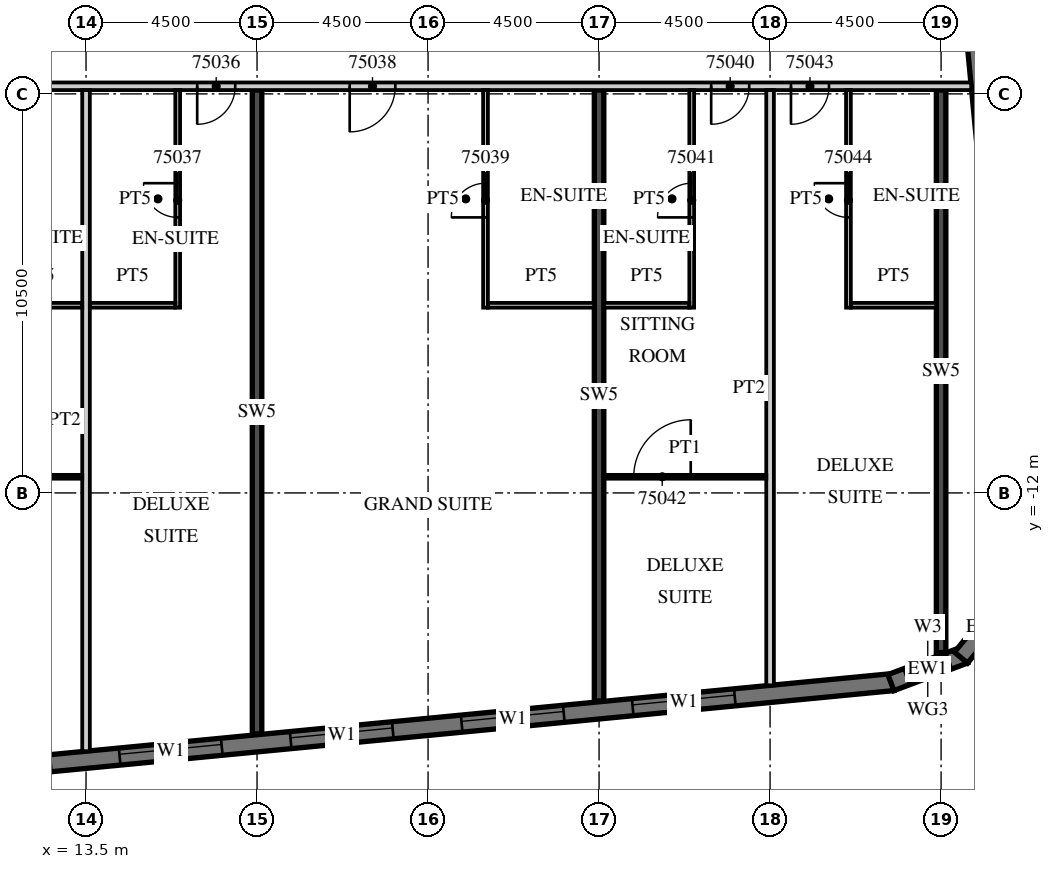
"""IFC4 building model, lengths in metres.
Left out: names, types, materials, properties, quantities, classifications, styles, units other than length and angle.
Written with IfcOpenShell. Run it as: python <this file> out.ifc"""

import sys

from ifc_helpers import new_model, si_unit, direction, frame, frame_2d, origin, place, context, subcontext, project, spatial, polyline, rectangle, outline, extrude, element, fill, save


model = new_model("IFC4")
c1 = context("Model", 3, precision=1e-05, world=origin(), true_north=direction((0.0, 1.0)))
c2 = subcontext(c1, "Body", "Model", "MODEL_VIEW")
j1 = project(units=[si_unit("LENGTHUNIT", "METRE"), si_unit("PLANEANGLEUNIT", "RADIAN")], contexts=[c1])
p1 = place(None, origin())
s1 = spatial("IfcSite", under=j1, at=p1, CompositionType="ELEMENT")
p2 = place(p1, origin())
s2 = spatial("IfcBuilding", under=s1, at=p2, CompositionType="ELEMENT")
p3 = place(p2, frame((0.0, 0.0, 298.2)))
s3 = spatial("IfcBuildingStorey", under=s2, at=p3, CompositionType="ELEMENT", Elevation=298.2)
p4 = place(p3, frame((18.0, -18.341, 0.0), z_axis=(0.0, 0.0, 1.0), x_axis=(0.0, 1.0, 0.0)))
e1 = element("IfcWall", 1, at=p4, inside=s3, PredefinedType="SHEAR", context=c2, shape_type="SweptSolid", body=[
    extrude(rectangle(XDim=16.941, YDim=0.25, at=frame_2d((8.47, 0.0))), origin(), (0.0, 0.0, 1.0), 3.3),
])
p5 = place(p3, frame((27.0, -17.474, 0.0), z_axis=(0.0, 0.0, 1.0), x_axis=(0.0, 1.0, 0.0)))
e2 = element("IfcWall", 2, at=p5, inside=s3, PredefinedType="SHEAR", context=c2, shape_type="SweptSolid", body=[
    extrude(rectangle(XDim=16.074, YDim=0.25, at=frame_2d((8.037, 0.0))), origin(), (0.0, 0.0, 1.0), 3.3),
])
p6 = place(p3, frame((36.0, -16.199, 0.0), z_axis=(0.0, 0.0, 1.0), x_axis=(0.0, 1.0, 0.0)))
e3 = element("IfcWall", 3, at=p6, inside=s3, PredefinedType="SHEAR", context=c2, shape_type="SweptSolid", body=[
    extrude(rectangle(XDim=14.799, YDim=0.25, at=frame_2d((7.399, 0.0))), origin(), (0.0, 0.0, 1.0), 3.3),
])
p7 = place(p3, frame((-13.521, -21.624, 0.0), z_axis=(0.0, 0.0, 1.0), x_axis=(0.995396186218, 0.095845878695, 0.0)))
e4 = element("IfcWall", 4, at=p7, inside=s3, PredefinedType="SOLIDWALL", context=c2, shape_type="SweptSolid", body=[
    extrude(rectangle(XDim=48.481, YDim=0.45, at=frame_2d((24.241, 0.0))), origin(), (0.0, 0.0, 1.0), 3.02),
])
p8 = place(p7, frame((0.91, 0.0, 0.45)))
e5 = element("IfcOpeningElement", 5, at=p8, cuts=e4, PredefinedType="OPENING", context=c2, shape_type="SweptSolid", body=[
    extrude(rectangle(XDim=2.7, YDim=2.25, at=frame_2d((1.35, 1.125))), frame((0.0, 0.235, 0.0), z_axis=(0.0, -1.0, 0.0), x_axis=(1.0, 0.0, 0.0)), (0.0, 0.0, 1.0), 0.47),
])
p9 = place(p7, frame((5.431, 0.0, 0.45)))
e6 = element("IfcOpeningElement", 6, at=p9, cuts=e4, PredefinedType="OPENING", context=c2, shape_type="SweptSolid", body=[
    extrude(rectangle(XDim=2.7, YDim=2.25, at=frame_2d((1.35, 1.125))), frame((0.0, 0.235, 0.0), z_axis=(0.0, -1.0, 0.0), x_axis=(1.0, 0.0, 0.0)), (0.0, 0.0, 1.0), 0.47),
])
p10 = place(p7, frame((9.952, 0.0, 0.45)))
e7 = element("IfcOpeningElement", 7, at=p10, cuts=e4, PredefinedType="OPENING", context=c2, shape_type="SweptSolid", body=[
    extrude(rectangle(XDim=2.7, YDim=2.25, at=frame_2d((1.35, 1.125))), frame((0.0, 0.235, 0.0), z_axis=(0.0, -1.0, 0.0), x_axis=(1.0, 0.0, 0.0)), (0.0, 0.0, 1.0), 0.47),
])
p11 = place(p7, frame((14.473, 0.0, 0.45)))
e8 = element("IfcOpeningElement", 8, at=p11, cuts=e4, PredefinedType="OPENING", context=c2, shape_type="SweptSolid", body=[
    extrude(rectangle(XDim=2.7, YDim=2.25, at=frame_2d((1.35, 1.125))), frame((0.0, 0.235, 0.0), z_axis=(0.0, -1.0, 0.0), x_axis=(1.0, 0.0, 0.0)), (0.0, 0.0, 1.0), 0.47),
])
p12 = place(p7, frame((18.994, 0.0, 0.45)))
e9 = element("IfcOpeningElement", 9, at=p12, cuts=e4, PredefinedType="OPENING", context=c2, shape_type="SweptSolid", body=[
    extrude(rectangle(XDim=2.7, YDim=2.25, at=frame_2d((1.35, 1.125))), frame((0.0, 0.235, 0.0), z_axis=(0.0, -1.0, 0.0), x_axis=(1.0, 0.0, 0.0)), (0.0, 0.0, 1.0), 0.47),
])
p13 = place(p7, frame((23.514, 0.0, 0.45)))
e10 = element("IfcOpeningElement", 10, at=p13, cuts=e4, PredefinedType="OPENING", context=c2, shape_type="SweptSolid", body=[
    extrude(rectangle(XDim=2.7, YDim=2.25, at=frame_2d((1.35, 1.125))), frame((0.0, 0.235, 0.0), z_axis=(0.0, -1.0, 0.0), x_axis=(1.0, 0.0, 0.0)), (0.0, 0.0, 1.0), 0.47),
])
p14 = place(p7, frame((28.035, 0.0, 0.45)))
e11 = element("IfcOpeningElement", 11, at=p14, cuts=e4, PredefinedType="OPENING", context=c2, shape_type="SweptSolid", body=[
    extrude(rectangle(XDim=2.7, YDim=2.25, at=frame_2d((1.35, 1.125))), frame((0.0, 0.235, 0.0), z_axis=(0.0, -1.0, 0.0), x_axis=(1.0, 0.0, 0.0)), (0.0, 0.0, 1.0), 0.47),
])
p15 = place(p7, frame((32.556, 0.0, 0.45)))
e12 = element("IfcOpeningElement", 12, at=p15, cuts=e4, PredefinedType="OPENING", context=c2, shape_type="SweptSolid", body=[
    extrude(rectangle(XDim=2.7, YDim=2.25, at=frame_2d((1.35, 1.125))), frame((0.0, 0.235, 0.0), z_axis=(0.0, -1.0, 0.0), x_axis=(1.0, 0.0, 0.0)), (0.0, 0.0, 1.0), 0.47),
])
p16 = place(p7, frame((37.077, 0.0, 0.45)))
e13 = element("IfcOpeningElement", 13, at=p16, cuts=e4, PredefinedType="OPENING", context=c2, shape_type="SweptSolid", body=[
    extrude(rectangle(XDim=2.7, YDim=2.25, at=frame_2d((1.35, 1.125))), frame((0.0, 0.235, 0.0), z_axis=(0.0, -1.0, 0.0), x_axis=(1.0, 0.0, 0.0)), (0.0, 0.0, 1.0), 0.47),
])
p17 = place(p7, frame((41.598, 0.0, 0.45)))
e14 = element("IfcOpeningElement", 14, at=p17, cuts=e4, PredefinedType="OPENING", context=c2, shape_type="SweptSolid", body=[
    extrude(rectangle(XDim=2.7, YDim=2.25, at=frame_2d((1.35, 1.125))), frame((0.0, 0.235, 0.0), z_axis=(0.0, -1.0, 0.0), x_axis=(1.0, 0.0, 0.0)), (0.0, 0.0, 1.0), 0.47),
])
p18 = place(p3, frame((34.679, -16.99, 0.0), z_axis=(0.0, 0.0, 1.0), x_axis=(0.936677599948, 0.350192909346, 0.0)))
e15 = element("IfcWall", 15, at=p18, inside=s3, PredefinedType="SOLIDWALL", context=c2, shape_type="SweptSolid", body=[
    extrude(outline(polyline([(0.0, -0.225), (2.071, -0.225), (1.95, 0.225), (0.121, 0.225), (0.0, -0.225)])), origin(), (0.0, 0.0, 1.0), 3.02),
])
p19 = place(p18, frame((0.435, 0.0, 0.45)))
e16 = element("IfcOpeningElement", 16, at=p19, cuts=e15, PredefinedType="OPENING", context=c2, shape_type="SweptSolid", body=[
    extrude(rectangle(XDim=1.2, YDim=2.25, at=frame_2d((0.6, 1.125))), frame((0.0, 0.235, 0.0), z_axis=(0.0, -1.0, 0.0), x_axis=(1.0, 0.0, 0.0)), (0.0, 0.0, 1.0), 0.47),
])
p20 = place(p3, frame((36.524, -16.333, 0.0), z_axis=(0.0, 0.0, 1.0), x_axis=(0.636046112757, 0.771651049663, 0.0)))
e17 = element("IfcWall", 17, at=p20, inside=s3, PredefinedType="SOLIDWALL", context=c2, shape_type="SweptSolid", body=[
    extrude(outline(polyline([(0.0, -0.225), (2.071, -0.225), (1.95, 0.225), (0.121, 0.225), (0.0, -0.225)])), origin(), (0.0, 0.0, 1.0), 3.02),
])
p21 = place(p3, frame((38.132, -12.858, 0.0), z_axis=(0.0, 0.0, 1.0), x_axis=(-0.095847749461, 0.995396006082, 0.0)))
e18 = element("IfcWall", 18, at=p21, inside=s3, PredefinedType="SOLIDWALL", context=c2, shape_type="SweptSolid", body=[
    extrude(rectangle(XDim=32.0, YDim=0.45, at=frame_2d((16.0, 0.0))), origin(), (0.0, 0.0, 1.0), 3.02),
])
p22 = place(p3, frame((-13.5, -1.3, 0.0), z_axis=(0.0, 0.0, 1.0), x_axis=(1.0, 0.0, 0.0)))
e19 = element("IfcWall", 19, at=p22, inside=s3, PredefinedType="PARTITIONING", context=c2, shape_type="SweptSolid", body=[
    extrude(rectangle(XDim=50.293, YDim=0.2, at=frame_2d((25.146, 0.0))), origin(), (0.0, 0.0, 1.0), 3.02),
])
p23 = place(p22, frame((2.925, 0.0, 0.0)))
e20 = element("IfcOpeningElement", 20, at=p23, cuts=e19, PredefinedType="OPENING", context=c2, shape_type="SweptSolid", body=[
    extrude(rectangle(XDim=1.0, YDim=2.1, at=frame_2d((0.5, 1.05))), frame((0.0, 0.11, 0.0), z_axis=(0.0, -1.0, 0.0), x_axis=(1.0, 0.0, 0.0)), (0.0, 0.0, 1.0), 0.22),
])
p24 = place(p22, frame((7.45, 0.0, 0.0)))
e21 = element("IfcOpeningElement", 21, at=p24, cuts=e19, PredefinedType="OPENING", context=c2, shape_type="SweptSolid", body=[
    extrude(rectangle(XDim=1.0, YDim=2.1, at=frame_2d((0.5, 1.05))), frame((0.0, 0.11, 0.0), z_axis=(0.0, -1.0, 0.0), x_axis=(1.0, 0.0, 0.0)), (0.0, 0.0, 1.0), 0.22),
])
p25 = place(p22, frame((9.55, 0.0, 0.0)))
e22 = element("IfcOpeningElement", 22, at=p25, cuts=e19, PredefinedType="OPENING", context=c2, shape_type="SweptSolid", body=[
    extrude(rectangle(XDim=1.0, YDim=2.1, at=frame_2d((0.5, 1.05))), frame((0.0, 0.11, 0.0), z_axis=(0.0, -1.0, 0.0), x_axis=(1.0, 0.0, 0.0)), (0.0, 0.0, 1.0), 0.22),
])
p26 = place(p22, frame((18.862, 0.0, 0.0)))
e23 = element("IfcOpeningElement", 23, at=p26, cuts=e19, PredefinedType="OPENING", context=c2, shape_type="SweptSolid", body=[
    extrude(rectangle(XDim=1.2, YDim=2.1, at=frame_2d((0.6, 1.05))), frame((0.0, 0.11, 0.0), z_axis=(0.0, -1.0, 0.0), x_axis=(1.0, 0.0, 0.0)), (0.0, 0.0, 1.0), 0.22),
])
p27 = place(p22, frame((23.075, 0.0, 0.0)))
e24 = element("IfcOpeningElement", 24, at=p27, cuts=e19, PredefinedType="OPENING", context=c2, shape_type="SweptSolid", body=[
    extrude(rectangle(XDim=1.0, YDim=2.1, at=frame_2d((0.5, 1.05))), frame((0.0, 0.11, 0.0), z_axis=(0.0, -1.0, 0.0), x_axis=(1.0, 0.0, 0.0)), (0.0, 0.0, 1.0), 0.22),
])
p28 = place(p22, frame((29.925, 0.0, 0.0)))
e25 = element("IfcOpeningElement", 25, at=p28, cuts=e19, PredefinedType="OPENING", context=c2, shape_type="SweptSolid", body=[
    extrude(rectangle(XDim=1.0, YDim=2.1, at=frame_2d((0.5, 1.05))), frame((0.0, 0.11, 0.0), z_axis=(0.0, -1.0, 0.0), x_axis=(1.0, 0.0, 0.0)), (0.0, 0.0, 1.0), 0.22),
])
p29 = place(p22, frame((33.938, 0.0, 0.0)))
e26 = element("IfcOpeningElement", 26, at=p29, cuts=e19, PredefinedType="OPENING", context=c2, shape_type="SweptSolid", body=[
    extrude(rectangle(XDim=1.2, YDim=2.1, at=frame_2d((0.6, 1.05))), frame((0.0, 0.11, 0.0), z_axis=(0.0, -1.0, 0.0), x_axis=(1.0, 0.0, 0.0)), (0.0, 0.0, 1.0), 0.22),
])
p30 = place(p22, frame((43.45, 0.0, 0.0)))
e27 = element("IfcOpeningElement", 27, at=p30, cuts=e19, PredefinedType="OPENING", context=c2, shape_type="SweptSolid", body=[
    extrude(rectangle(XDim=1.0, YDim=2.1, at=frame_2d((0.5, 1.05))), frame((0.0, 0.11, 0.0), z_axis=(0.0, -1.0, 0.0), x_axis=(1.0, 0.0, 0.0)), (0.0, 0.0, 1.0), 0.22),
])
p31 = place(p22, frame((45.55, 0.0, 0.0)))
e28 = element("IfcOpeningElement", 28, at=p31, cuts=e19, PredefinedType="OPENING", context=c2, shape_type="SweptSolid", body=[
    extrude(rectangle(XDim=1.0, YDim=2.1, at=frame_2d((0.5, 1.05))), frame((0.0, 0.11, 0.0), z_axis=(0.0, -1.0, 0.0), x_axis=(1.0, 0.0, 0.0)), (0.0, 0.0, 1.0), 0.22),
])
p32 = place(p3, frame((13.5, -18.796, 0.0), z_axis=(0.0, 0.0, 1.0), x_axis=(0.0, 1.0, 0.0)))
e29 = element("IfcWall", 29, at=p32, inside=s3, PredefinedType="PARTITIONING", context=c2, shape_type="SweptSolid", body=[
    extrude(rectangle(XDim=17.396, YDim=0.2, at=frame_2d((8.698, 0.0))), origin(), (0.0, 0.0, 1.0), 3.02),
])
p33 = place(p3, frame((11.15, -7.062, 0.0), z_axis=(0.0, 0.0, 1.0), x_axis=(1.0, 0.0, 0.0)))
e30 = element("IfcWall", 30, at=p33, inside=s3, PredefinedType="PARTITIONING", context=c2, shape_type="SweptSolid", body=[
    extrude(rectangle(XDim=2.25, YDim=0.125, at=frame_2d((1.125, 0.0))), origin(), (0.0, 0.0, 1.0), 3.02),
])
p34 = place(p3, frame((9.125, -11.575, 0.0), z_axis=(0.0, 0.0, 1.0), x_axis=(1.0, 0.0, 0.0)))
e31 = element("IfcWall", 31, at=p34, inside=s3, PredefinedType="PARTITIONING", context=c2, shape_type="SweptSolid", body=[
    extrude(rectangle(XDim=4.275, YDim=0.1, at=frame_2d((2.137, 0.0))), origin(), (0.0, 0.0, 1.0), 3.02),
])
p35 = place(p34, frame((0.787, 0.0, 0.0)))
e32 = element("IfcOpeningElement", 32, at=p35, cuts=e31, PredefinedType="OPENING", context=c2, shape_type="SweptSolid", body=[
    extrude(rectangle(XDim=1.5, YDim=2.1, at=frame_2d((0.75, 1.05))), frame((0.0, 0.06, 0.0), z_axis=(0.0, -1.0, 0.0), x_axis=(1.0, 0.0, 0.0)), (0.0, 0.0, 1.0), 0.12),
])
p36 = place(p3, frame((15.912, -7.125, 0.0), z_axis=(0.0, 0.0, 1.0), x_axis=(0.0, 1.0, 0.0)))
e33 = element("IfcWall", 33, at=p36, inside=s3, PredefinedType="PARTITIONING", context=c2, shape_type="SweptSolid", body=[
    extrude(rectangle(XDim=5.725, YDim=0.125, at=frame_2d((2.863, 0.0))), origin(), (0.0, 0.0, 1.0), 3.02),
])
p37 = place(p36, frame((2.375, 0.0, 0.0)))
e34 = element("IfcOpeningElement", 34, at=p37, cuts=e33, PredefinedType="OPENING", context=c2, shape_type="SweptSolid", body=[
    extrude(rectangle(XDim=0.9, YDim=2.1, at=frame_2d((0.45, 1.05))), frame((0.0, 0.073, 0.0), z_axis=(0.0, -1.0, 0.0), x_axis=(1.0, 0.0, 0.0)), (0.0, 0.0, 1.0), 0.145),
])
p38 = place(p3, frame((13.6, -7.062, 0.0), z_axis=(0.0, 0.0, 1.0), x_axis=(1.0, 0.0, 0.0)))
e35 = element("IfcWall", 35, at=p38, inside=s3, PredefinedType="PARTITIONING", context=c2, shape_type="SweptSolid", body=[
    extrude(rectangle(XDim=2.25, YDim=0.125, at=frame_2d((1.125, 0.0))), origin(), (0.0, 0.0, 1.0), 3.02),
])
p39 = place(p3, frame((24.012, -7.125, 0.0), z_axis=(0.0, 0.0, 1.0), x_axis=(0.0, 1.0, 0.0)))
e36 = element("IfcWall", 36, at=p39, inside=s3, PredefinedType="PARTITIONING", context=c2, shape_type="SweptSolid", body=[
    extrude(rectangle(XDim=5.725, YDim=0.125, at=frame_2d((2.863, 0.0))), origin(), (0.0, 0.0, 1.0), 3.02),
])
p40 = place(p39, frame((2.375, 0.0, 0.0)))
e37 = element("IfcOpeningElement", 37, at=p40, cuts=e36, PredefinedType="OPENING", context=c2, shape_type="SweptSolid", body=[
    extrude(rectangle(XDim=0.9, YDim=2.1, at=frame_2d((0.45, 1.05))), frame((0.0, 0.073, 0.0), z_axis=(0.0, -1.0, 0.0), x_axis=(1.0, 0.0, 0.0)), (0.0, 0.0, 1.0), 0.145),
])
p41 = place(p3, frame((24.075, -7.062, 0.0), z_axis=(0.0, 0.0, 1.0), x_axis=(1.0, 0.0, 0.0)))
e38 = element("IfcWall", 38, at=p41, inside=s3, PredefinedType="PARTITIONING", context=c2, shape_type="SweptSolid", body=[
    extrude(rectangle(XDim=2.8, YDim=0.125, at=frame_2d((1.4, 0.0))), origin(), (0.0, 0.0, 1.0), 3.02),
])
p42 = place(p3, frame((31.5, -17.063, 0.0), z_axis=(0.0, 0.0, 1.0), x_axis=(0.0, 1.0, 0.0)))
e39 = element("IfcWall", 39, at=p42, inside=s3, PredefinedType="PARTITIONING", context=c2, shape_type="SweptSolid", body=[
    extrude(rectangle(XDim=15.663, YDim=0.2, at=frame_2d((7.832, 0.0))), origin(), (0.0, 0.0, 1.0), 3.02),
])
p43 = place(p3, frame((29.438, -7.125, 0.0), z_axis=(0.0, 0.0, 1.0), x_axis=(0.0, 1.0, 0.0)))
e40 = element("IfcWall", 40, at=p43, inside=s3, PredefinedType="PARTITIONING", context=c2, shape_type="SweptSolid", body=[
    extrude(rectangle(XDim=5.725, YDim=0.125, at=frame_2d((2.863, 0.0))), origin(), (0.0, 0.0, 1.0), 3.02),
])
p44 = place(p43, frame((2.375, 0.0, 0.0)))
e41 = element("IfcOpeningElement", 41, at=p44, cuts=e40, PredefinedType="OPENING", context=c2, shape_type="SweptSolid", body=[
    extrude(rectangle(XDim=0.9, YDim=2.1, at=frame_2d((0.45, 1.05))), frame((0.0, 0.073, 0.0), z_axis=(0.0, -1.0, 0.0), x_axis=(1.0, 0.0, 0.0)), (0.0, 0.0, 1.0), 0.145),
])
p45 = place(p3, frame((27.125, -7.062, 0.0), z_axis=(0.0, 0.0, 1.0), x_axis=(1.0, 0.0, 0.0)))
e42 = element("IfcWall", 42, at=p45, inside=s3, PredefinedType="PARTITIONING", context=c2, shape_type="SweptSolid", body=[
    extrude(rectangle(XDim=2.25, YDim=0.125, at=frame_2d((1.125, 0.0))), origin(), (0.0, 0.0, 1.0), 3.02),
])
p46 = place(p3, frame((27.125, -11.575, 0.0), z_axis=(0.0, 0.0, 1.0), x_axis=(1.0, 0.0, 0.0)))
e43 = element("IfcWall", 43, at=p46, inside=s3, PredefinedType="PARTITIONING", context=c2, shape_type="SweptSolid", body=[
    extrude(rectangle(XDim=4.275, YDim=0.1, at=frame_2d((2.137, 0.0))), origin(), (0.0, 0.0, 1.0), 3.02),
])
p47 = place(p46, frame((0.787, 0.0, 0.0)))
e44 = element("IfcOpeningElement", 44, at=p47, cuts=e43, PredefinedType="OPENING", context=c2, shape_type="SweptSolid", body=[
    extrude(rectangle(XDim=1.5, YDim=2.1, at=frame_2d((0.75, 1.05))), frame((0.0, 0.06, 0.0), z_axis=(0.0, -1.0, 0.0), x_axis=(1.0, 0.0, 0.0)), (0.0, 0.0, 1.0), 0.12),
])
p48 = place(p3, frame((33.562, -7.125, 0.0), z_axis=(0.0, 0.0, 1.0), x_axis=(0.0, 1.0, 0.0)))
e45 = element("IfcWall", 45, at=p48, inside=s3, PredefinedType="PARTITIONING", context=c2, shape_type="SweptSolid", body=[
    extrude(rectangle(XDim=5.725, YDim=0.125, at=frame_2d((2.863, 0.0))), origin(), (0.0, 0.0, 1.0), 3.02),
])
p49 = place(p48, frame((2.375, 0.0, 0.0)))
e46 = element("IfcOpeningElement", 46, at=p49, cuts=e45, PredefinedType="OPENING", context=c2, shape_type="SweptSolid", body=[
    extrude(rectangle(XDim=0.9, YDim=2.1, at=frame_2d((0.45, 1.05))), frame((0.0, 0.073, 0.0), z_axis=(0.0, -1.0, 0.0), x_axis=(1.0, 0.0, 0.0)), (0.0, 0.0, 1.0), 0.145),
])
p50 = place(p3, frame((33.625, -7.062, 0.0), z_axis=(0.0, 0.0, 1.0), x_axis=(1.0, 0.0, 0.0)))
e47 = element("IfcWall", 47, at=p50, inside=s3, PredefinedType="PARTITIONING", context=c2, shape_type="SweptSolid", body=[
    extrude(rectangle(XDim=2.25, YDim=0.125, at=frame_2d((1.125, 0.0))), origin(), (0.0, 0.0, 1.0), 3.02),
])
p51 = place(p14, origin())
e48 = element("IfcWindow", 48, at=p51, inside=s3, PartitioningType="SINGLE_PANEL", PredefinedType="WINDOW", context=c2, shape_type="SweptSolid", body=[
    extrude(rectangle(XDim=2.7, YDim=2.25, at=frame_2d((1.35, 1.125))), frame((0.0, 0.09, 0.0), z_axis=(0.0, -1.0, 0.0), x_axis=(1.0, 0.0, 0.0)), (0.0, 0.0, 1.0), 0.06),
])
fill(e11, e48)
p52 = place(p15, origin())
e49 = element("IfcWindow", 49, at=p52, inside=s3, PartitioningType="SINGLE_PANEL", PredefinedType="WINDOW", context=c2, shape_type="SweptSolid", body=[
    extrude(rectangle(XDim=2.7, YDim=2.25, at=frame_2d((1.35, 1.125))), frame((0.0, 0.09, 0.0), z_axis=(0.0, -1.0, 0.0), x_axis=(1.0, 0.0, 0.0)), (0.0, 0.0, 1.0), 0.06),
])
fill(e12, e49)
p53 = place(p16, origin())
e50 = element("IfcWindow", 50, at=p53, inside=s3, PartitioningType="SINGLE_PANEL", PredefinedType="WINDOW", context=c2, shape_type="SweptSolid", body=[
    extrude(rectangle(XDim=2.7, YDim=2.25, at=frame_2d((1.35, 1.125))), frame((0.0, 0.09, 0.0), z_axis=(0.0, -1.0, 0.0), x_axis=(1.0, 0.0, 0.0)), (0.0, 0.0, 1.0), 0.06),
])
fill(e13, e50)
p54 = place(p17, origin())
e51 = element("IfcWindow", 51, at=p54, inside=s3, PartitioningType="SINGLE_PANEL", PredefinedType="WINDOW", context=c2, shape_type="SweptSolid", body=[
    extrude(rectangle(XDim=2.7, YDim=2.25, at=frame_2d((1.35, 1.125))), frame((0.0, 0.09, 0.0), z_axis=(0.0, -1.0, 0.0), x_axis=(1.0, 0.0, 0.0)), (0.0, 0.0, 1.0), 0.06),
])
fill(e14, e51)
p55 = place(p19, origin())
e52 = element("IfcWindow", 52, at=p55, inside=s3, PartitioningType="SINGLE_PANEL", PredefinedType="WINDOW", context=c2, shape_type="SweptSolid", body=[
    extrude(rectangle(XDim=1.2, YDim=2.25, at=frame_2d((0.6, 1.125))), frame((0.0, 0.09, 0.0), z_axis=(0.0, -1.0, 0.0), x_axis=(1.0, 0.0, 0.0)), (0.0, 0.0, 1.0), 0.06),
])
fill(e16, e52)
p56 = place(p28, origin())
e53 = element("IfcDoor", 53, at=p56, inside=s3, OperationType="SINGLE_SWING_LEFT", PredefinedType="DOOR", context=c2, shape_type="SweptSolid", body=[
    extrude(rectangle(XDim=1.0, YDim=2.1, at=frame_2d((0.5, 1.05))), frame((0.0, 0.025, 0.0), z_axis=(0.0, -1.0, 0.0), x_axis=(1.0, 0.0, 0.0)), (0.0, 0.0, 1.0), 0.05),
])
fill(e25, e53)
p57 = place(p37, origin())
e54 = element("IfcDoor", 54, at=p57, inside=s3, OperationType="SINGLE_SWING_RIGHT", PredefinedType="DOOR", context=c2, shape_type="SweptSolid", body=[
    extrude(rectangle(XDim=0.9, YDim=2.1, at=frame_2d((0.45, 1.05))), frame((0.0, 0.025, 0.0), z_axis=(0.0, -1.0, 0.0), x_axis=(1.0, 0.0, 0.0)), (0.0, 0.0, 1.0), 0.05),
])
fill(e34, e54)
p58 = place(p29, origin())
e55 = element("IfcDoor", 55, at=p58, inside=s3, OperationType="SINGLE_SWING_LEFT", PredefinedType="DOOR", context=c2, shape_type="SweptSolid", body=[
    extrude(rectangle(XDim=1.2, YDim=2.1, at=frame_2d((0.6, 1.05))), frame((0.0, 0.025, 0.0), z_axis=(0.0, -1.0, 0.0), x_axis=(1.0, 0.0, 0.0)), (0.0, 0.0, 1.0), 0.05),
])
fill(e26, e55)
p59 = place(p40, origin())
e56 = element("IfcDoor", 56, at=p59, inside=s3, OperationType="SINGLE_SWING_LEFT", PredefinedType="DOOR", context=c2, shape_type="SweptSolid", body=[
    extrude(rectangle(XDim=0.9, YDim=2.1, at=frame_2d((0.45, 1.05))), frame((0.0, 0.025, 0.0), z_axis=(0.0, -1.0, 0.0), x_axis=(1.0, 0.0, 0.0)), (0.0, 0.0, 1.0), 0.05),
])
fill(e37, e56)
p60 = place(p30, origin())
e57 = element("IfcDoor", 57, at=p60, inside=s3, OperationType="SINGLE_SWING_LEFT", PredefinedType="DOOR", context=c2, shape_type="SweptSolid", body=[
    extrude(rectangle(XDim=1.0, YDim=2.1, at=frame_2d((0.5, 1.05))), frame((0.0, 0.025, 0.0), z_axis=(0.0, -1.0, 0.0), x_axis=(1.0, 0.0, 0.0)), (0.0, 0.0, 1.0), 0.05),
])
fill(e27, e57)
p61 = place(p44, origin())
e58 = element("IfcDoor", 58, at=p61, inside=s3, OperationType="SINGLE_SWING_LEFT", PredefinedType="DOOR", context=c2, shape_type="SweptSolid", body=[
    extrude(rectangle(XDim=0.9, YDim=2.1, at=frame_2d((0.45, 1.05))), frame((0.0, 0.025, 0.0), z_axis=(0.0, -1.0, 0.0), x_axis=(1.0, 0.0, 0.0)), (0.0, 0.0, 1.0), 0.05),
])
fill(e41, e58)
p62 = place(p47, origin())
e59 = element("IfcDoor", 59, at=p62, inside=s3, OperationType="SINGLE_SWING_RIGHT", PredefinedType="DOOR", context=c2, shape_type="SweptSolid", body=[
    extrude(rectangle(XDim=1.5, YDim=2.1, at=frame_2d((0.75, 1.05))), frame((0.0, 0.025, 0.0), z_axis=(0.0, -1.0, 0.0), x_axis=(1.0, 0.0, 0.0)), (0.0, 0.0, 1.0), 0.05),
])
fill(e44, e59)
p63 = place(p31, origin())
e60 = element("IfcDoor", 60, at=p63, inside=s3, OperationType="SINGLE_SWING_LEFT", PredefinedType="DOOR", context=c2, shape_type="SweptSolid", body=[
    extrude(rectangle(XDim=1.0, YDim=2.1, at=frame_2d((0.5, 1.05))), frame((0.0, 0.025, 0.0), z_axis=(0.0, -1.0, 0.0), x_axis=(1.0, 0.0, 0.0)), (0.0, 0.0, 1.0), 0.05),
])
fill(e28, e60)
p64 = place(p49, origin())
e61 = element("IfcDoor", 61, at=p64, inside=s3, OperationType="SINGLE_SWING_RIGHT", PredefinedType="DOOR", context=c2, shape_type="SweptSolid", body=[
    extrude(rectangle(XDim=0.9, YDim=2.1, at=frame_2d((0.45, 1.05))), frame((0.0, 0.025, 0.0), z_axis=(0.0, -1.0, 0.0), x_axis=(1.0, 0.0, 0.0)), (0.0, 0.0, 1.0), 0.05),
])
fill(e46, e61)
save(model, sys.argv[1])
